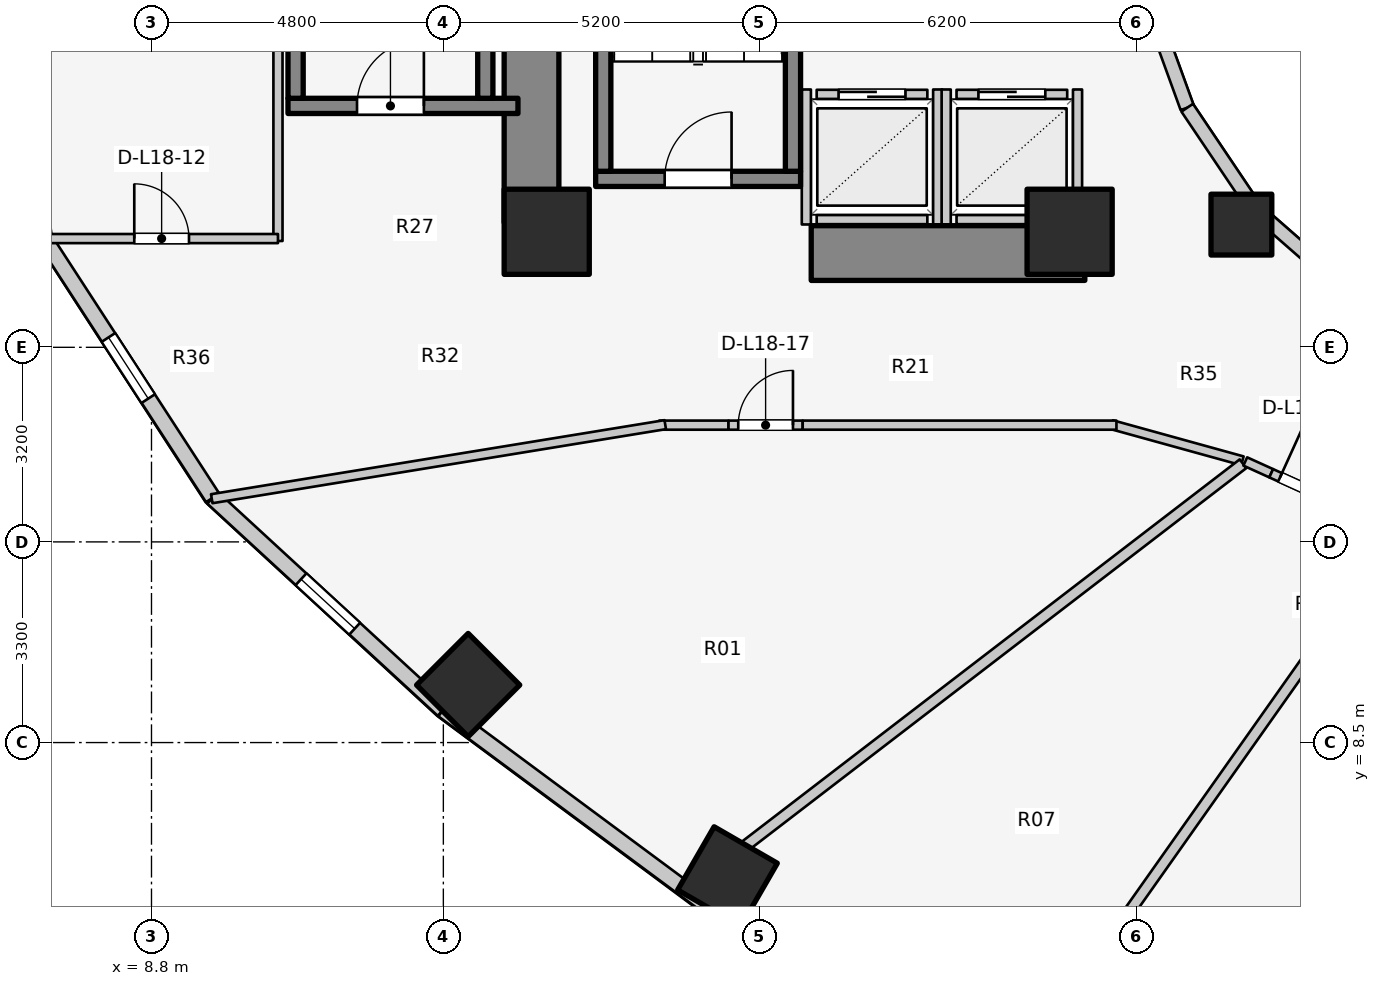
"""IFC4 building model, lengths in metres.
Left out: names, types, materials, properties, quantities, classifications, styles, units other than length and angle.
Written with IfcOpenShell. Run it as: python <this file> out.ifc"""

import sys

from ifc_helpers import new_model, si_unit, direction, frame, frame_2d, origin, origin_2d, place, context, subcontext, project, spatial, rectangle, extrude, element, fill, save


model = new_model("IFC4")
c1 = context("Model", 3, precision=1e-05, world=origin(), true_north=direction((0.0, 1.0)))
c2 = subcontext(c1, "Body", "Model", "MODEL_VIEW")
j1 = project(units=[si_unit("LENGTHUNIT", "METRE"), si_unit("PLANEANGLEUNIT", "RADIAN")], contexts=[c1])
p1 = place(None, origin())
s1 = spatial("IfcSite", under=j1, at=p1, CompositionType="ELEMENT")
p2 = place(p1, origin())
s2 = spatial("IfcBuilding", under=s1, at=p2, CompositionType="ELEMENT")
p3 = place(p2, frame((0.0, 0.0, 61.7)))
s3 = spatial("IfcBuildingStorey", under=s2, at=p3, CompositionType="ELEMENT", Elevation=61.7)
p4 = place(p3, frame((15.05, 17.05, 0.0), z_axis=(0.0, 0.0, 1.0), x_axis=(0.0, 1.0, 0.0)))
e1 = element("IfcWall", 1, at=p4, inside=s3, PredefinedType="SHEAR", context=c2, shape_type="SweptSolid", body=[
    extrude(rectangle(XDim=12.8, YDim=0.9, at=frame_2d((6.4, 0.0))), origin(), (0.0, 0.0, 1.0), 3.1),
])
p5 = place(p3, frame((19.65, 16.55, 0.0), z_axis=(0.0, 0.0, 1.0), x_axis=(1.0, 0.0, 0.0)))
e2 = element("IfcWall", 2, at=p5, inside=s3, PredefinedType="SHEAR", context=c2, shape_type="SweptSolid", body=[
    extrude(rectangle(XDim=4.5, YDim=0.9, at=frame_2d((2.25, 0.0))), origin(), (0.0, 0.0, 1.0), 3.1),
])
p6 = place(p3, frame((16.105, 17.77, 0.0), z_axis=(0.0, 0.0, 1.0), x_axis=(1.0, 0.0, 0.0)))
e3 = element("IfcWall", 3, at=p6, inside=s3, PredefinedType="SOLIDWALL", context=c2, shape_type="SweptSolid", body=[
    extrude(rectangle(XDim=3.37, YDim=0.25, at=frame_2d((1.685, 0.0))), origin(), (0.0, 0.0, 1.0), 3.1),
])
p7 = place(p6, frame((1.135, 0.0, 0.0)))
e4 = element("IfcOpeningElement", 4, at=p7, cuts=e3, PredefinedType="OPENING", context=c2, shape_type="SweptSolid", body=[
    extrude(rectangle(XDim=1.1, YDim=2.1, at=frame_2d((0.55, 1.05))), frame((0.0, 0.135, 0.0), z_axis=(0.0, -1.0, 0.0), x_axis=(1.0, 0.0, 0.0)), (0.0, 0.0, 1.0), 0.27),
])
for number, where, z_axis, x_axis in (
    (5, (16.23, 17.895, 0.0), (0.0, 0.0, 1.0), (0.0, 1.0, 0.0)),
    (6, (19.35, 17.895, 0.0), (0.0, 0.0, 1.0), (0.0, 1.0, 0.0)),
):
    element("IfcWall", number, at=place(p3, frame(where, z_axis=z_axis, x_axis=x_axis)), inside=s3, PredefinedType="SOLIDWALL", context=c2, shape_type="SweptSolid", body=[
        extrude(rectangle(XDim=7.81, YDim=0.25, at=frame_2d((3.905, 0.0))), origin(), (0.0, 0.0, 1.0), 3.1),
    ])
p8 = place(p3, frame((11.045, 18.97, 0.0), z_axis=(0.0, 0.0, 1.0), x_axis=(1.0, 0.0, 0.0)))
e7 = element("IfcWall", 7, at=p8, inside=s3, PredefinedType="SOLIDWALL", context=c2, shape_type="SweptSolid", body=[
    extrude(rectangle(XDim=3.782, YDim=0.25, at=frame_2d((1.891, 0.0))), origin(), (0.0, 0.0, 1.0), 3.1),
])
p9 = place(p8, frame((1.135, 0.0, 0.0)))
e8 = element("IfcOpeningElement", 8, at=p9, cuts=e7, PredefinedType="OPENING", context=c2, shape_type="SweptSolid", body=[
    extrude(rectangle(XDim=1.1, YDim=2.1, at=frame_2d((0.55, 1.05))), frame((0.0, 0.135, 0.0), z_axis=(0.0, -1.0, 0.0), x_axis=(1.0, 0.0, 0.0)), (0.0, 0.0, 1.0), 0.27),
])
for number, where, z_axis, x_axis in (
    (9, (11.17, 19.095, 0.0), (0.0, 0.0, 1.0), (0.0, 1.0, 0.0)),
    (10, (14.29, 19.095, 0.0), (0.0, 0.0, 1.0), (0.0, 1.0, 0.0)),
):
    element("IfcWall", number, at=place(p3, frame(where, z_axis=z_axis, x_axis=x_axis)), inside=s3, PredefinedType="SOLIDWALL", context=c2, shape_type="SweptSolid", body=[
        extrude(rectangle(XDim=7.81, YDim=0.25, at=frame_2d((3.905, 0.0))), origin(), (0.0, 0.0, 1.0), 3.1),
    ])
for number, where, z_axis, x_axis in (
    (11, (15.3, 16.9, 0.0), (0.0, 0.0, 1.0), (1.0, 0.0, 0.0)),
    (12, (23.9, 16.9, 0.0), (0.0, 0.0, 1.0), (1.0, 0.0, 0.0)),
):
    element("IfcColumn", number, at=place(p3, frame(where, z_axis=z_axis, x_axis=x_axis)), inside=s3, PredefinedType="COLUMN", context=c2, shape_type="SweptSolid", body=[
        extrude(rectangle(XDim=1.4, YDim=1.4, at=origin_2d()), origin(), (0.0, 0.0, 1.0), 3.1),
    ])
p10 = place(p3, frame((26.725, 17.018, 0.0), z_axis=(0.0, 0.0, 1.0), x_axis=(1.0, 0.0, 0.0)))
e13 = element("IfcColumn", 13, at=p10, inside=s3, PredefinedType="COLUMN", context=c2, shape_type="SweptSolid", body=[
    extrude(rectangle(XDim=1.0, YDim=1.0, at=origin_2d()), origin(), (0.0, 0.0, 1.0), 3.1),
])
for number, where, z_axis, x_axis in (
    (14, (14.008, 9.446, 0.0), (0.0, 0.0, 1.0), (-0.707, -0.707, 0.0)),
    (15, (18.273, 6.296, 0.0), (0.0, 0.0, 1.0), (-0.5, -0.866, 0.0)),
):
    element("IfcColumn", number, at=place(p3, frame(where, z_axis=z_axis, x_axis=x_axis)), inside=s3, PredefinedType="COLUMN", context=c2, shape_type="SweptSolid", body=[
        extrude(rectangle(XDim=1.2, YDim=1.2, at=origin_2d()), origin(), (0.0, 0.0, 1.0), 3.1),
    ])
p11 = place(p3, frame((25.123, 20.898, 0.0), z_axis=(0.0, 0.0, 1.0), x_axis=(0.341423187295, -0.93990968033, 0.0)))
e16 = element("IfcWall", 16, at=p11, inside=s3, PredefinedType="STANDARD", context=c2, shape_type="SweptSolid", body=[
    extrude(rectangle(XDim=2.084, YDim=0.23, at=frame_2d((1.042, 0.0))), origin(), (0.0, 0.0, 1.0), 2.56),
])
p12 = place(p3, frame((25.834, 18.94, 0.0), z_axis=(0.0, 0.0, 1.0), x_axis=(0.558197800898, -0.829707909492, 0.0)))
e17 = element("IfcWall", 17, at=p12, inside=s3, PredefinedType="STANDARD", context=c2, shape_type="SweptSolid", body=[
    extrude(rectangle(XDim=2.027, YDim=0.23, at=frame_2d((1.013, 0.0))), origin(), (0.0, 0.0, 1.0), 1.22),
])
p13 = place(p3, frame((26.965, 17.258, 0.0), z_axis=(0.0, 0.0, 1.0), x_axis=(0.752576694707, -0.658504607869, 0.0)))
e18 = element("IfcWall", 18, at=p13, inside=s3, PredefinedType="STANDARD", context=c2, shape_type="SweptSolid", body=[
    extrude(rectangle(XDim=1.959, YDim=0.23, at=frame_2d((0.98, 0.0))), origin(), (0.0, 0.0, 1.0), 1.22),
])
p14 = place(p3, frame((7.033, 16.795, 0.0), z_axis=(0.0, 0.0, 1.0), x_axis=(0.544578722263, -0.838709732421, 0.0)))
e19 = element("IfcWall", 19, at=p14, inside=s3, PredefinedType="STANDARD", context=c2, shape_type="SweptSolid", body=[
    extrude(rectangle(XDim=5.092, YDim=0.26, at=frame_2d((2.546, 0.0))), origin(), (0.0, 0.0, 1.0), 1.22),
])
p15 = place(p14, frame((1.946, 0.0, 0.15)))
e20 = element("IfcOpeningElement", 20, at=p15, cuts=e19, PredefinedType="OPENING", context=c2, shape_type="SweptSolid", body=[
    extrude(rectangle(XDim=1.2, YDim=0.9, at=frame_2d((0.6, 0.45))), frame((0.0, 0.14, 0.0), z_axis=(0.0, -1.0, 0.0), x_axis=(1.0, 0.0, 0.0)), (0.0, 0.0, 1.0), 0.28),
])
p16 = place(p3, frame((9.806, 12.524, 0.0), z_axis=(0.0, 0.0, 1.0), x_axis=(0.735655109293, -0.67735630223, 0.0)))
e21 = element("IfcWall", 21, at=p16, inside=s3, PredefinedType="STANDARD", context=c2, shape_type="SweptSolid", body=[
    extrude(rectangle(XDim=5.151, YDim=0.26, at=frame_2d((2.575, 0.0))), origin(), (0.0, 0.0, 1.0), 1.22),
])
p17 = place(p16, frame((1.976, 0.0, 0.15)))
e22 = element("IfcOpeningElement", 22, at=p17, cuts=e21, PredefinedType="OPENING", context=c2, shape_type="SweptSolid", body=[
    extrude(rectangle(XDim=1.2, YDim=0.9, at=frame_2d((0.6, 0.45))), frame((0.0, 0.14, 0.0), z_axis=(0.0, -1.0, 0.0), x_axis=(1.0, 0.0, 0.0)), (0.0, 0.0, 1.0), 0.28),
])
p18 = place(p3, frame((13.595, 9.035, 0.0), z_axis=(0.0, 0.0, 1.0), x_axis=(0.803477531792, -0.595335078679, 0.0)))
e23 = element("IfcWall", 23, at=p18, inside=s3, PredefinedType="STANDARD", context=c2, shape_type="SweptSolid", body=[
    extrude(rectangle(XDim=5.43, YDim=0.26, at=frame_2d((2.715, 0.0))), origin(), (0.0, 0.0, 1.0), 1.22),
])
p19 = place(p3, frame((19.74, 19.16, 0.0), z_axis=(0.0, 0.0, 1.0), x_axis=(1.0, 0.0, 0.0)))
e24 = element("IfcWall", 24, at=p19, inside=s3, PredefinedType="SOLIDWALL", context=c2, shape_type="SweptSolid", body=[
    extrude(rectangle(XDim=1.82, YDim=0.15, at=frame_2d((0.91, 0.0))), origin(), (0.0, 0.0, 1.0), 2.575),
])
p20 = place(p19, frame((0.36, 0.0, 0.0)))
e25 = element("IfcOpeningElement", 25, at=p20, cuts=e24, PredefinedType="OPENING", context=c2, shape_type="SweptSolid", body=[
    extrude(rectangle(XDim=1.1, YDim=2.1, at=frame_2d((0.55, 1.05))), frame((0.0, 0.085, 0.0), z_axis=(0.0, -1.0, 0.0), x_axis=(1.0, 0.0, 0.0)), (0.0, 0.0, 1.0), 0.17),
])
p21 = place(p3, frame((19.74, 17.1, 0.0), z_axis=(0.0, 0.0, 1.0), x_axis=(1.0, 0.0, 0.0)))
e26 = element("IfcWall", 26, at=p21, inside=s3, PredefinedType="SOLIDWALL", context=c2, shape_type="SweptSolid", body=[
    extrude(rectangle(XDim=1.82, YDim=0.15, at=frame_2d((0.91, 0.0))), origin(), (0.0, 0.0, 1.0), 2.575),
])
p22 = place(p3, frame((19.57, 17.02, 0.0), z_axis=(0.0, 0.0, 1.0), x_axis=(0.0, 1.0, 0.0)))
e27 = element("IfcWall", 27, at=p22, inside=s3, PredefinedType="SOLIDWALL", context=c2, shape_type="SweptSolid", body=[
    extrude(rectangle(XDim=2.22, YDim=0.15, at=frame_2d((1.11, 0.0))), origin(), (0.0, 0.0, 1.0), 2.12),
])
p23 = place(p3, frame((21.73, 17.02, 0.0), z_axis=(0.0, 0.0, 1.0), x_axis=(0.0, 1.0, 0.0)))
e28 = element("IfcWall", 28, at=p23, inside=s3, PredefinedType="SOLIDWALL", context=c2, shape_type="SweptSolid", body=[
    extrude(rectangle(XDim=2.22, YDim=0.15, at=frame_2d((1.11, 0.0))), origin(), (0.0, 0.0, 1.0), 2.575),
])
p24 = place(p3, frame((22.04, 19.16, 0.0), z_axis=(0.0, 0.0, 1.0), x_axis=(1.0, 0.0, 0.0)))
e29 = element("IfcWall", 29, at=p24, inside=s3, PredefinedType="SOLIDWALL", context=c2, shape_type="SweptSolid", body=[
    extrude(rectangle(XDim=1.82, YDim=0.15, at=frame_2d((0.91, 0.0))), origin(), (0.0, 0.0, 1.0), 2.12),
])
p25 = place(p24, frame((0.36, 0.0, 0.0)))
e30 = element("IfcOpeningElement", 30, at=p25, cuts=e29, PredefinedType="OPENING", context=c2, shape_type="SweptSolid", body=[
    extrude(rectangle(XDim=1.1, YDim=2.1, at=frame_2d((0.55, 1.05))), frame((0.0, 0.085, 0.0), z_axis=(0.0, -1.0, 0.0), x_axis=(1.0, 0.0, 0.0)), (0.0, 0.0, 1.0), 0.17),
])
p26 = place(p3, frame((22.04, 17.1, 0.0), z_axis=(0.0, 0.0, 1.0), x_axis=(1.0, 0.0, 0.0)))
e31 = element("IfcWall", 31, at=p26, inside=s3, PredefinedType="SOLIDWALL", context=c2, shape_type="SweptSolid", body=[
    extrude(rectangle(XDim=1.82, YDim=0.15, at=frame_2d((0.91, 0.0))), origin(), (0.0, 0.0, 1.0), 2.12),
])
p27 = place(p3, frame((21.87, 17.02, 0.0), z_axis=(0.0, 0.0, 1.0), x_axis=(0.0, 1.0, 0.0)))
e32 = element("IfcWall", 32, at=p27, inside=s3, PredefinedType="SOLIDWALL", context=c2, shape_type="SweptSolid", body=[
    extrude(rectangle(XDim=2.22, YDim=0.15, at=frame_2d((1.11, 0.0))), origin(), (0.0, 0.0, 1.0), 2.575),
])
p28 = place(p3, frame((24.03, 17.02, 0.0), z_axis=(0.0, 0.0, 1.0), x_axis=(0.0, 1.0, 0.0)))
e33 = element("IfcWall", 33, at=p28, inside=s3, PredefinedType="SOLIDWALL", context=c2, shape_type="SweptSolid", body=[
    extrude(rectangle(XDim=2.22, YDim=0.15, at=frame_2d((1.11, 0.0))), origin(), (0.0, 0.0, 1.0), 1.873),
])
p29 = place(p3, frame((10.88, 16.748, 0.0), z_axis=(0.0, 0.0, 1.0), x_axis=(0.0, 1.0, 0.0)))
e34 = element("IfcWall", 34, at=p29, inside=s3, PredefinedType="PARTITIONING", context=c2, shape_type="SweptSolid", body=[
    extrude(rectangle(XDim=12.503, YDim=0.15, at=frame_2d((6.252, 0.0))), origin(), (0.0, 0.0, 1.0), 2.12),
])
p30 = place(p3, frame((7.014, 16.788, 0.0), z_axis=(0.0, 0.0, 1.0), x_axis=(1.0, 0.0, 0.0)))
e35 = element("IfcWall", 35, at=p30, inside=s3, PredefinedType="PARTITIONING", context=c2, shape_type="SweptSolid", body=[
    extrude(rectangle(XDim=3.866, YDim=0.15, at=frame_2d((1.933, 0.0))), origin(), (0.0, 0.0, 1.0), 2.575),
])
p31 = place(p30, frame((1.503, 0.0, 0.0)))
e36 = element("IfcOpeningElement", 36, at=p31, cuts=e35, PredefinedType="OPENING", context=c2, shape_type="SweptSolid", body=[
    extrude(rectangle(XDim=0.9, YDim=2.1, at=frame_2d((0.45, 1.05))), frame((0.0, 0.085, 0.0), z_axis=(0.0, -1.0, 0.0), x_axis=(1.0, 0.0, 0.0)), (0.0, 0.0, 1.0), 0.17),
])
p32 = place(p3, frame((26.742, 13.133, 0.0), z_axis=(0.0, 0.0, 1.0), x_axis=(-0.963833843713, 0.266503886865, 0.0)))
e37 = element("IfcWall", 37, at=p32, inside=s3, PredefinedType="PARTITIONING", context=c2, shape_type="SweptSolid", body=[
    extrude(rectangle(XDim=2.232, YDim=0.15, at=frame_2d((1.116, 0.0))), origin(), (0.0, 0.0, 1.0), 1.22),
])
p33 = place(p3, frame((17.15, 13.72, 0.0), z_axis=(0.0, 0.0, 1.0), x_axis=(1.0, 0.0, 0.0)))
e38 = element("IfcWall", 38, at=p33, inside=s3, PredefinedType="PARTITIONING", context=c2, shape_type="SweptSolid", body=[
    extrude(rectangle(XDim=1.14, YDim=0.15, at=frame_2d((0.57, 0.0))), origin(), (0.0, 0.0, 1.0), 2.575),
])
p34 = place(p3, frame((18.29, 13.72, 0.0), z_axis=(0.0, 0.0, 1.0), x_axis=(1.0, 0.0, 0.0)))
e39 = element("IfcWall", 39, at=p34, inside=s3, PredefinedType="PARTITIONING", context=c2, shape_type="SweptSolid", body=[
    extrude(rectangle(XDim=1.22, YDim=0.15, at=frame_2d((0.61, 0.0))), origin(), (0.0, 0.0, 1.0), 2.575),
])
p35 = place(p34, frame((0.16, 0.0, 0.0)))
e40 = element("IfcOpeningElement", 40, at=p35, cuts=e39, PredefinedType="OPENING", context=c2, shape_type="SweptSolid", body=[
    extrude(rectangle(XDim=0.9, YDim=2.1, at=frame_2d((0.45, 1.05))), frame((0.0, 0.085, 0.0), z_axis=(0.0, -1.0, 0.0), x_axis=(1.0, 0.0, 0.0)), (0.0, 0.0, 1.0), 0.17),
])
p36 = place(p3, frame((19.51, 13.72, 0.0), z_axis=(0.0, 0.0, 1.0), x_axis=(1.0, 0.0, 0.0)))
e41 = element("IfcWall", 41, at=p36, inside=s3, PredefinedType="PARTITIONING", context=c2, shape_type="SweptSolid", body=[
    extrude(rectangle(XDim=5.16, YDim=0.15, at=frame_2d((2.58, 0.0))), origin(), (0.0, 0.0, 1.0), 1.22),
])
p37 = place(p3, frame((17.249, 13.728, 0.0), z_axis=(0.0, 0.0, 1.0), x_axis=(-0.98693078372, -0.161144742846, 0.0)))
e42 = element("IfcWall", 42, at=p37, inside=s3, PredefinedType="PARTITIONING", context=c2, shape_type="SweptSolid", body=[
    extrude(rectangle(XDim=7.557, YDim=0.15, at=frame_2d((3.779, 0.0))), origin(), (0.0, 0.0, 1.0), 1.22),
])
p38 = place(p3, frame((26.751, 13.085, 0.0), z_axis=(0.0, 0.0, 1.0), x_axis=(-0.793181014702, -0.608985942298, 0.0)))
e43 = element("IfcWall", 43, at=p38, inside=s3, PredefinedType="PARTITIONING", context=c2, shape_type="SweptSolid", body=[
    extrude(rectangle(XDim=10.324, YDim=0.18, at=frame_2d((5.162, 0.0))), origin(), (0.0, 0.0, 1.0), 1.22),
])
p39 = place(p3, frame((29.274, 11.934, 0.0), z_axis=(0.0, 0.0, 1.0), x_axis=(-0.577036915124, -0.816718065543, 0.0)))
e44 = element("IfcWall", 44, at=p39, inside=s3, PredefinedType="PARTITIONING", context=c2, shape_type="SweptSolid", body=[
    extrude(rectangle(XDim=9.131, YDim=0.18, at=frame_2d((4.565, 0.0))), origin(), (0.0, 0.0, 1.0), 1.22),
])
p40 = place(p3, frame((26.789, 13.123, 0.0), z_axis=(0.0, 0.0, 1.0), x_axis=(0.910580557663, -0.413331644091, 0.0)))
e45 = element("IfcWall", 45, at=p40, inside=s3, PredefinedType="PARTITIONING", context=c2, shape_type="SweptSolid", body=[
    extrude(rectangle(XDim=0.469, YDim=0.15, at=frame_2d((0.234, 0.0))), origin(), (0.0, 0.0, 1.0), 2.575),
])
p41 = place(p3, frame((27.215, 12.929, 0.0), z_axis=(0.0, 0.0, 1.0), x_axis=(0.910491529429, -0.413527719553, 0.0)))
e46 = element("IfcWall", 46, at=p41, inside=s3, PredefinedType="PARTITIONING", context=c2, shape_type="SweptSolid", body=[
    extrude(rectangle(XDim=1.27, YDim=0.15, at=frame_2d((0.635, 0.0))), origin(), (0.0, 0.0, 1.0), 2.16),
])
p42 = place(p41, frame((0.16, 0.0, 0.0)))
e47 = element("IfcOpeningElement", 47, at=p42, cuts=e46, PredefinedType="OPENING", context=c2, shape_type="SweptSolid", body=[
    extrude(rectangle(XDim=0.95, YDim=2.1, at=frame_2d((0.475, 1.05))), frame((0.0, 0.085, 0.0), z_axis=(0.0, -1.0, 0.0), x_axis=(1.0, 0.0, 0.0)), (0.0, 0.0, 1.0), 0.17),
])
p43 = place(p15, origin())
e48 = element("IfcWindow", 48, at=p43, inside=s3, PartitioningType="SINGLE_PANEL", PredefinedType="WINDOW", context=c2, shape_type="SweptSolid", body=[
    extrude(rectangle(XDim=1.2, YDim=0.9, at=frame_2d((0.6, 0.45))), frame((0.0, 0.03, 0.0), z_axis=(0.0, -1.0, 0.0), x_axis=(1.0, 0.0, 0.0)), (0.0, 0.0, 1.0), 0.06),
])
fill(e20, e48)
p44 = place(p17, origin())
e49 = element("IfcWindow", 49, at=p44, inside=s3, PartitioningType="SINGLE_PANEL", PredefinedType="WINDOW", context=c2, shape_type="SweptSolid", body=[
    extrude(rectangle(XDim=1.2, YDim=0.9, at=frame_2d((0.6, 0.45))), frame((0.0, 0.03, 0.0), z_axis=(0.0, -1.0, 0.0), x_axis=(1.0, 0.0, 0.0)), (0.0, 0.0, 1.0), 0.06),
])
fill(e22, e49)
p45 = place(p7, origin())
e50 = element("IfcDoor", 50, at=p45, inside=s3, OperationType="SINGLE_SWING_RIGHT", PredefinedType="DOOR", context=c2, shape_type="SweptSolid", body=[
    extrude(rectangle(XDim=1.1, YDim=2.1, at=frame_2d((0.55, 1.05))), frame((0.0, 0.025, 0.0), z_axis=(0.0, -1.0, 0.0), x_axis=(1.0, 0.0, 0.0)), (0.0, 0.0, 1.0), 0.05),
])
fill(e4, e50)
p46 = place(p9, origin())
e51 = element("IfcDoor", 51, at=p46, inside=s3, OperationType="SINGLE_SWING_RIGHT", PredefinedType="DOOR", context=c2, shape_type="SweptSolid", body=[
    extrude(rectangle(XDim=1.1, YDim=2.1, at=frame_2d((0.55, 1.05))), frame((0.0, 0.025, 0.0), z_axis=(0.0, -1.0, 0.0), x_axis=(1.0, 0.0, 0.0)), (0.0, 0.0, 1.0), 0.05),
])
fill(e8, e51)
p47 = place(p20, origin())
e52 = element("IfcDoor", 52, at=p47, inside=s3, OperationType="DOUBLE_DOOR_SLIDING", PredefinedType="DOOR", context=c2, shape_type="SweptSolid", body=[
    extrude(rectangle(XDim=1.1, YDim=2.1, at=frame_2d((0.55, 1.05))), frame((0.0, 0.025, 0.0), z_axis=(0.0, -1.0, 0.0), x_axis=(1.0, 0.0, 0.0)), (0.0, 0.0, 1.0), 0.05),
])
fill(e25, e52)
p48 = place(p25, origin())
e53 = element("IfcDoor", 53, at=p48, inside=s3, OperationType="DOUBLE_DOOR_SLIDING", PredefinedType="DOOR", context=c2, shape_type="SweptSolid", body=[
    extrude(rectangle(XDim=1.1, YDim=2.1, at=frame_2d((0.55, 1.05))), frame((0.0, 0.025, 0.0), z_axis=(0.0, -1.0, 0.0), x_axis=(1.0, 0.0, 0.0)), (0.0, 0.0, 1.0), 0.05),
])
fill(e30, e53)
p49 = place(p31, origin())
e54 = element("IfcDoor", 54, at=p49, inside=s3, OperationType="SINGLE_SWING_LEFT", PredefinedType="DOOR", context=c2, shape_type="SweptSolid", body=[
    extrude(rectangle(XDim=0.9, YDim=2.1, at=frame_2d((0.45, 1.05))), frame((0.0, 0.025, 0.0), z_axis=(0.0, -1.0, 0.0), x_axis=(1.0, 0.0, 0.0)), (0.0, 0.0, 1.0), 0.05),
])
fill(e36, e54)
p50 = place(p35, origin())
e55 = element("IfcDoor", 55, at=p50, inside=s3, OperationType="SINGLE_SWING_RIGHT", PredefinedType="DOOR", context=c2, shape_type="SweptSolid", body=[
    extrude(rectangle(XDim=0.9, YDim=2.1, at=frame_2d((0.45, 1.05))), frame((0.0, 0.025, 0.0), z_axis=(0.0, -1.0, 0.0), x_axis=(1.0, 0.0, 0.0)), (0.0, 0.0, 1.0), 0.05),
])
fill(e40, e55)
p51 = place(p42, origin())
e56 = element("IfcDoor", 56, at=p51, inside=s3, OperationType="SINGLE_SWING_LEFT", PredefinedType="DOOR", context=c2, shape_type="SweptSolid", body=[
    extrude(rectangle(XDim=0.95, YDim=2.1, at=frame_2d((0.475, 1.05))), frame((0.0, 0.025, 0.0), z_axis=(0.0, -1.0, 0.0), x_axis=(1.0, 0.0, 0.0)), (0.0, 0.0, 1.0), 0.05),
])
fill(e47, e56)
save(model, sys.argv[1])
